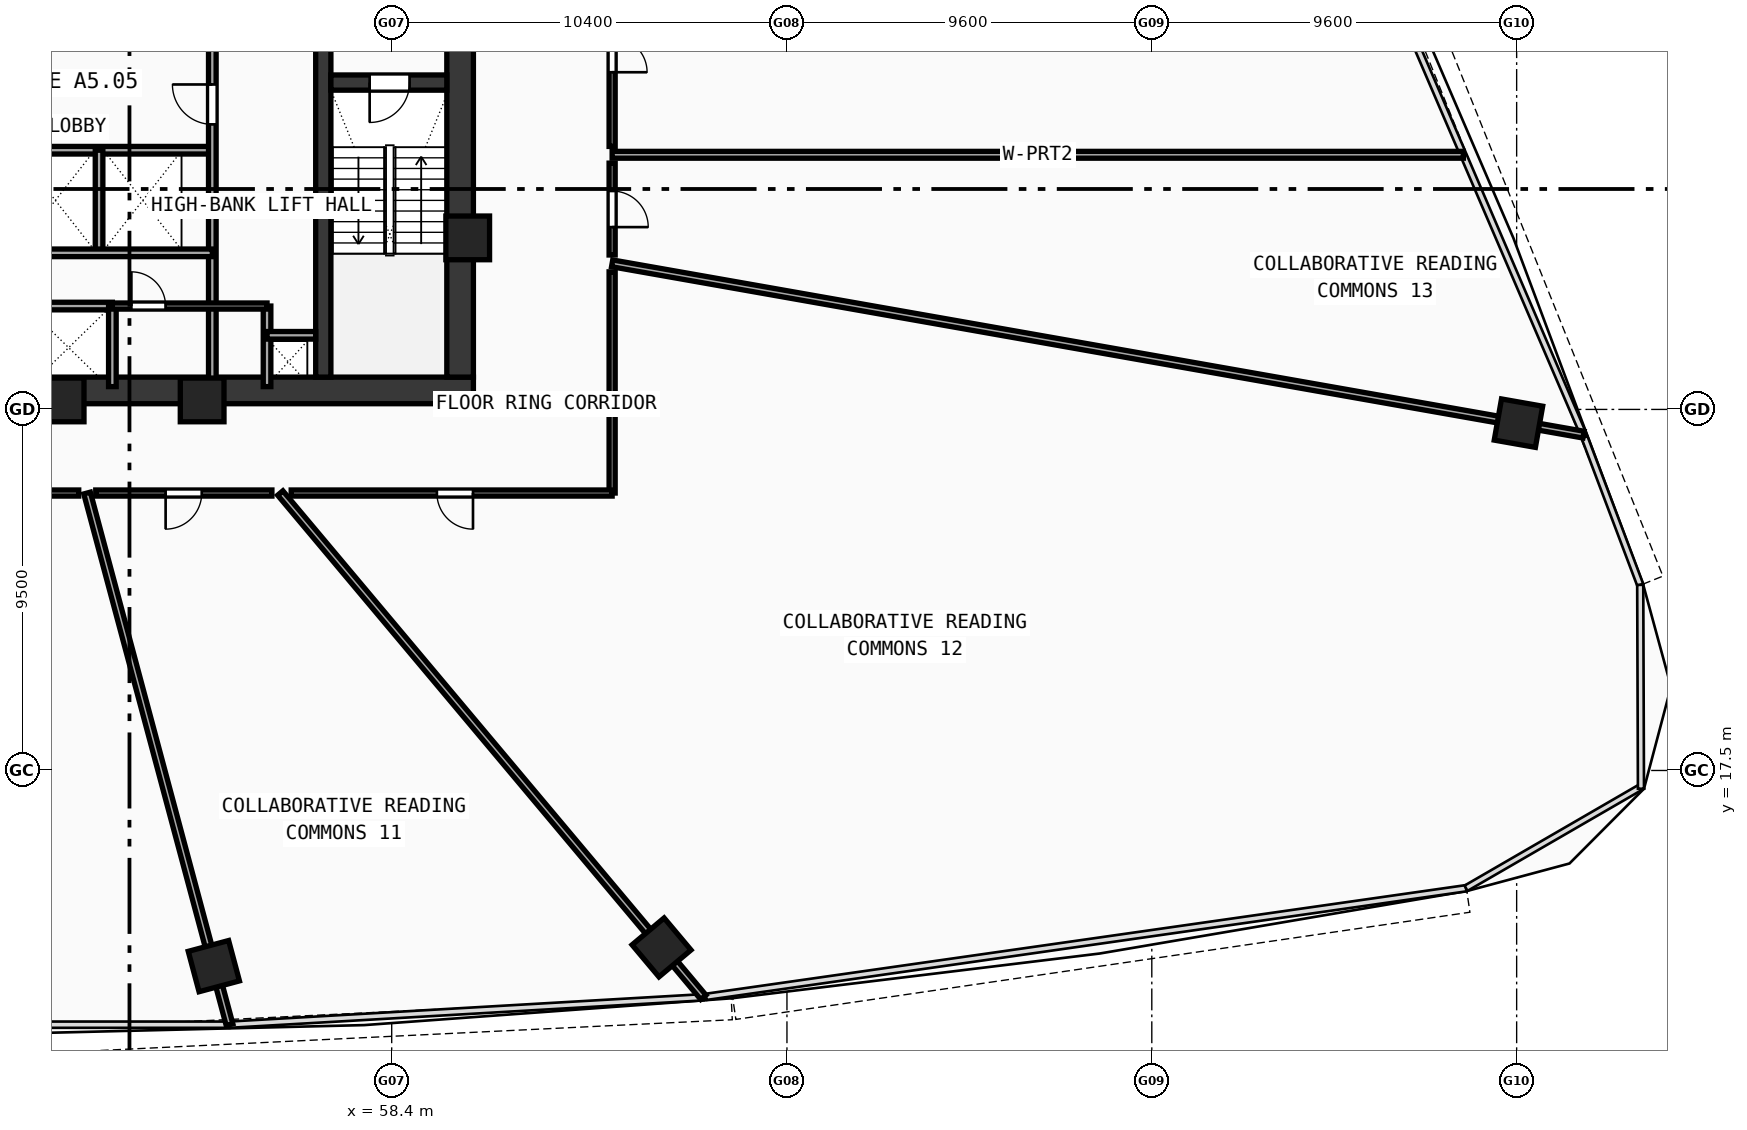
"""IFC4 building model, lengths in metres.
Left out: names, types, materials, properties, quantities, classifications, styles, units other than length and angle.
Written with IfcOpenShell. Run it as: python <this file> out.ifc"""

import sys

from ifc_helpers import new_model, si_unit, direction, frame, frame_2d, origin, origin_with_axes, origin_2d, place, context, subcontext, project, spatial, rectangle, hollow_rectangle, extrude, source, transform, mapped, element, fill, save


model = new_model("IFC4")
c1 = context("Model", 3, precision=1e-05, world=origin(), true_north=direction((0.0, 1.0)))
c2 = subcontext(c1, "Body", "Model", "MODEL_VIEW")
j1 = project(units=[si_unit("LENGTHUNIT", "METRE"), si_unit("PLANEANGLEUNIT", "RADIAN")], contexts=[c1])
p1 = place(None, origin())
s1 = spatial("IfcSite", under=j1, at=p1, CompositionType="ELEMENT")
p2 = place(p1, origin())
s2 = spatial("IfcBuilding", under=s1, at=p2, CompositionType="ELEMENT")
p3 = place(p2, frame((0.0, 0.0, 41.29)))
s3 = spatial("IfcBuildingStorey", under=s2, at=p3, CompositionType="ELEMENT", Elevation=41.29)
p4 = place(p3, frame((35.45, 27.5, 0.0), z_axis=(0.0, 0.0, 1.0), x_axis=(1.0, 0.0, 0.0)))
e1 = element("IfcWall", 1, at=p4, inside=s3, PredefinedType="SHEAR", context=c2, shape_type="SweptSolid", body=[
    extrude(rectangle(XDim=25.1, YDim=0.7, at=frame_2d((12.55, 0.0))), origin(), (0.0, 0.0, 1.0), 3.37),
])
p5 = place(p3, frame((60.2, 27.85, 0.0), z_axis=(0.0, 0.0, 1.0), x_axis=(0.0, 1.0, 0.0)))
e2 = element("IfcWall", 2, at=p5, inside=s3, PredefinedType="SHEAR", context=c2, shape_type="SweptSolid", body=[
    extrude(rectangle(XDim=12.0, YDim=0.7, at=frame_2d((6.0, 0.0))), origin(), (0.0, 0.0, 1.0), 3.37),
])
p6 = place(p3, frame((56.6, 27.85, 0.0), z_axis=(0.0, 0.0, 1.0), x_axis=(0.0, 1.0, 0.0)))
e3 = element("IfcWall", 3, at=p6, inside=s3, PredefinedType="SHEAR", context=c2, shape_type="SweptSolid", body=[
    extrude(rectangle(XDim=12.0, YDim=0.4, at=frame_2d((6.0, 0.0))), origin(), (0.0, 0.0, 1.0), 3.37),
])
p7 = place(p6, frame((9.9, 0.0, 0.0)))
e4 = element("IfcOpeningElement", 4, at=p7, cuts=e3, PredefinedType="OPENING", context=c2, shape_type="SweptSolid", body=[
    extrude(rectangle(XDim=1.1, YDim=2.1, at=frame_2d((0.55, 1.05))), frame((0.0, 0.21, 0.0), z_axis=(0.0, -1.0, 0.0), x_axis=(1.0, 0.0, 0.0)), (0.0, 0.0, 1.0), 0.42),
])
p8 = place(p3, frame((56.8, 35.6, 0.0), z_axis=(0.0, 0.0, 1.0), x_axis=(1.0, 0.0, 0.0)))
e5 = element("IfcWall", 5, at=p8, inside=s3, PredefinedType="SHEAR", context=c2, shape_type="SweptSolid", body=[
    extrude(rectangle(XDim=3.05, YDim=0.4, at=frame_2d((1.525, 0.0))), origin(), (0.0, 0.0, 1.0), 3.37),
])
p9 = place(p8, frame((1.02, 0.0, 0.0)))
e6 = element("IfcOpeningElement", 6, at=p9, cuts=e5, PredefinedType="OPENING", context=c2, shape_type="SweptSolid", body=[
    extrude(rectangle(XDim=1.05, YDim=2.1, at=frame_2d((0.525, 1.05))), frame((0.0, 0.21, 0.0), z_axis=(0.0, -1.0, 0.0), x_axis=(1.0, 0.0, 0.0)), (0.0, 0.0, 1.0), 0.42),
])
m1 = source(origin(), c2, "Body", "SweptSolid", [
    extrude(hollow_rectangle(XDim=1.15, YDim=1.15, WallThickness=0.048, at=origin_2d()), origin(), (0.0, 0.0, 1.0), 3.63),
])
for number, where, z_axis, x_axis in (
    (7, (49.729, 27.25, -0.26), (0.0, 0.0, 1.0), (1.0, 0.0, 0.0)),
    (8, (53.412, 27.25, -0.26), (0.0, 0.0, 1.0), (1.0, 0.0, 0.0)),
    (9, (60.4, 31.513, -0.26), (0.0, 0.0, 1.0), (1.0, 0.0, 0.0)),
):
    element("IfcColumn", number, at=place(p3, frame(where, z_axis=z_axis, x_axis=x_axis)), inside=s3, PredefinedType="COLUMN", context=c2, shape_type="MappedRepresentation", body=[
        mapped(m1, transform((0.0, 0.0, 0.0), scale=1.0)),
    ])
m2 = source(origin(), c2, "Body", "SweptSolid", [
    extrude(hollow_rectangle(XDim=1.1, YDim=1.1, WallThickness=0.045, at=origin_2d()), origin(), (0.0, 0.0, 1.0), 3.63),
])
for number, where, z_axis, x_axis in (
    (10, (53.72, 12.352, -0.26), (0.0, 0.0, 1.0), (0.966, 0.259, 0.0)),
    (11, (65.5, 12.844, -0.26), (0.0, 0.0, 1.0), (0.766, 0.643, 0.0)),
    (12, (88.048, 26.638, -0.26), (0.0, 0.0, 1.0), (0.174, 0.985, 0.0)),
):
    element("IfcColumn", number, at=place(p3, frame(where, z_axis=z_axis, x_axis=x_axis)), inside=s3, PredefinedType="COLUMN", context=c2, shape_type="MappedRepresentation", body=[
        mapped(m2, transform((0.0, 0.0, 0.0), scale=1.0)),
    ])
p10 = place(p3, frame((43.85, 33.82, 0.0), z_axis=(0.0, 0.0, 1.0), x_axis=(1.0, 0.0, 0.0)))
e13 = element("IfcWall", 13, at=p10, inside=s3, PredefinedType="SOLIDWALL", context=c2, shape_type="SweptSolid", body=[
    extrude(rectangle(XDim=9.83, YDim=0.2, at=frame_2d((4.915, 0.0))), origin(), (0.0, 0.0, 1.0), 3.37),
])
p11 = place(p3, frame((53.68, 27.6, 0.0), z_axis=(0.0, 0.0, 1.0), x_axis=(0.0, 1.0, 0.0)))
e14 = element("IfcWall", 14, at=p11, inside=s3, PredefinedType="SOLIDWALL", context=c2, shape_type="SweptSolid", body=[
    extrude(rectangle(XDim=9.05, YDim=0.2, at=frame_2d((4.525, 0.0))), origin(), (0.0, 0.0, 1.0), 3.37),
])
p12 = place(p11, frame((6.9, 0.0, 0.0)))
e15 = element("IfcOpeningElement", 15, at=p12, cuts=e14, PredefinedType="OPENING", context=c2, shape_type="SweptSolid", body=[
    extrude(rectangle(XDim=1.05, YDim=2.1, at=frame_2d((0.525, 1.05))), frame((0.0, 0.11, 0.0), z_axis=(0.0, -1.0, 0.0), x_axis=(1.0, 0.0, 0.0)), (0.0, 0.0, 1.0), 0.22),
])
p13 = place(p3, frame((50.7, 31.12, 0.0), z_axis=(0.0, 0.0, 1.0), x_axis=(0.0, 1.0, 0.0)))
e16 = element("IfcWall", 16, at=p13, inside=s3, PredefinedType="SOLIDWALL", context=c2, shape_type="SweptSolid", body=[
    extrude(rectangle(XDim=2.7, YDim=0.2, at=frame_2d((1.35, 0.0))), origin(), (0.0, 0.0, 1.0), 3.37),
])
p14 = place(p3, frame((43.85, 29.72, 0.0), z_axis=(0.0, 0.0, 1.0), x_axis=(1.0, 0.0, 0.0)))
e17 = element("IfcWall", 17, at=p14, inside=s3, PredefinedType="SOLIDWALL", context=c2, shape_type="SweptSolid", body=[
    extrude(rectangle(XDim=7.2, YDim=0.2, at=frame_2d((3.6, 0.0))), origin(), (0.0, 0.0, 1.0), 3.37),
])
p15 = place(p3, frame((51.05, 27.6, 0.0), z_axis=(0.0, 0.0, 1.0), x_axis=(0.0, 1.0, 0.0)))
e18 = element("IfcWall", 18, at=p15, inside=s3, PredefinedType="SOLIDWALL", context=c2, shape_type="SweptSolid", body=[
    extrude(rectangle(XDim=2.12, YDim=0.2, at=frame_2d((1.06, 0.0))), origin(), (0.0, 0.0, 1.0), 3.37),
])
p16 = place(p3, frame((43.85, 31.12, 0.0), z_axis=(0.0, 0.0, 1.0), x_axis=(1.0, 0.0, 0.0)))
e19 = element("IfcWall", 19, at=p16, inside=s3, PredefinedType="SOLIDWALL", context=c2, shape_type="SweptSolid", body=[
    extrude(rectangle(XDim=9.83, YDim=0.2, at=frame_2d((4.915, 0.0))), origin(), (0.0, 0.0, 1.0), 3.37),
])
p17 = place(p3, frame((55.12, 27.6, 0.0), z_axis=(0.0, 0.0, 1.0), x_axis=(0.0, 1.0, 0.0)))
e20 = element("IfcWall", 20, at=p17, inside=s3, PredefinedType="SOLIDWALL", context=c2, shape_type="SweptSolid", body=[
    extrude(rectangle(XDim=2.12, YDim=0.2, at=frame_2d((1.06, 0.0))), origin(), (0.0, 0.0, 1.0), 3.37),
])
p18 = place(p3, frame((55.12, 28.95, 0.0), z_axis=(0.0, 0.0, 1.0), x_axis=(1.0, 0.0, 0.0)))
e21 = element("IfcWall", 21, at=p18, inside=s3, PredefinedType="SOLIDWALL", context=c2, shape_type="SweptSolid", body=[
    extrude(rectangle(XDim=1.28, YDim=0.2, at=frame_2d((0.64, 0.0))), origin(), (0.0, 0.0, 1.0), 3.37),
])
p19 = place(p3, frame((51.05, 29.72, 0.0), z_axis=(0.0, 0.0, 1.0), x_axis=(1.0, 0.0, 0.0)))
e22 = element("IfcWall", 22, at=p19, inside=s3, PredefinedType="PARTITIONING", context=c2, shape_type="SweptSolid", body=[
    extrude(rectangle(XDim=4.07, YDim=0.16, at=frame_2d((2.035, 0.0))), origin(), (0.0, 0.0, 1.0), 3.37),
])
p20 = place(p19, frame((0.5, 0.0, 0.0)))
e23 = element("IfcOpeningElement", 23, at=p20, cuts=e22, PredefinedType="OPENING", context=c2, shape_type="SweptSolid", body=[
    extrude(rectangle(XDim=0.9, YDim=2.1, at=frame_2d((0.45, 1.05))), frame((0.0, 0.09, 0.0), z_axis=(0.0, -1.0, 0.0), x_axis=(1.0, 0.0, 0.0)), (0.0, 0.0, 1.0), 0.18),
])
p21 = place(p3, frame((64.2, 33.7, 0.0), z_axis=(0.0, 0.0, 1.0), x_axis=(1.0, 0.0, 0.0)))
e24 = element("IfcWall", 24, at=p21, inside=s3, PredefinedType="PARTITIONING", context=c2, shape_type="SweptSolid", body=[
    extrude(rectangle(XDim=22.398, YDim=0.18, at=frame_2d((11.199, 0.0))), origin(), (0.0, 0.0, 1.0), 2.67),
])
p22 = place(p3, frame((50.385, 24.8, 0.0), z_axis=(0.0, 0.0, 1.0), x_axis=(0.258819787056, -0.965925627483, 0.0)))
e25 = element("IfcWall", 25, at=p22, inside=s3, PredefinedType="PARTITIONING", context=c2, shape_type="SweptSolid", body=[
    extrude(rectangle(XDim=14.482, YDim=0.18, at=frame_2d((7.241, 0.0))), origin(), (0.0, 0.0, 1.0), 2.67),
])
p23 = place(p3, frame((55.468, 24.8, 0.0), z_axis=(0.0, 0.0, 1.0), x_axis=(0.642784696521, -0.766046887546, 0.0)))
e26 = element("IfcWall", 26, at=p23, inside=s3, PredefinedType="PARTITIONING", context=c2, shape_type="SweptSolid", body=[
    extrude(rectangle(XDim=17.319, YDim=0.18, at=frame_2d((8.659, 0.0))), origin(), (0.0, 0.0, 1.0), 2.67),
])
p24 = place(p3, frame((64.2, 30.844, 0.0), z_axis=(0.0, 0.0, 1.0), x_axis=(0.984807792045, -0.173647956302, 0.0)))
e27 = element("IfcWall", 27, at=p24, inside=s3, PredefinedType="PARTITIONING", context=c2, shape_type="SweptSolid", body=[
    extrude(rectangle(XDim=25.954, YDim=0.18, at=frame_2d((12.977, 0.0))), origin(), (0.0, 0.0, 1.0), 2.67),
])
p25 = place(p3, frame((64.2, 38.744, 0.0), z_axis=(0.0, 0.0, 1.0), x_axis=(0.0, -1.0, 0.0)))
e28 = element("IfcWall", 28, at=p25, inside=s3, PredefinedType="PARTITIONING", context=c2, shape_type="SweptSolid", body=[
    extrude(rectangle(XDim=4.824, YDim=0.16, at=frame_2d((2.412, 0.0))), origin(), (0.0, 0.0, 1.0), 3.37),
])
p26 = place(p25, frame((1.952, 0.0, 0.0)))
e29 = element("IfcOpeningElement", 29, at=p26, cuts=e28, PredefinedType="OPENING", context=c2, shape_type="SweptSolid", body=[
    extrude(rectangle(XDim=0.92, YDim=2.1, at=frame_2d((0.46, 1.05))), frame((0.0, 0.09, 0.0), z_axis=(0.0, -1.0, 0.0), x_axis=(1.0, 0.0, 0.0)), (0.0, 0.0, 1.0), 0.18),
])
p27 = place(p3, frame((64.2, 33.48, 0.0), z_axis=(0.0, 0.0, 1.0), x_axis=(0.0, -1.0, 0.0)))
e30 = element("IfcWall", 30, at=p27, inside=s3, PredefinedType="PARTITIONING", context=c2, shape_type="SweptSolid", body=[
    extrude(rectangle(XDim=2.417, YDim=0.16, at=frame_2d((1.208, 0.0))), origin(), (0.0, 0.0, 1.0), 3.37),
])
p28 = place(p27, frame((0.733, 0.0, 0.0)))
e31 = element("IfcOpeningElement", 31, at=p28, cuts=e30, PredefinedType="OPENING", context=c2, shape_type="SweptSolid", body=[
    extrude(rectangle(XDim=0.95, YDim=2.1, at=frame_2d((0.475, 1.05))), frame((0.0, 0.09, 0.0), z_axis=(0.0, -1.0, 0.0), x_axis=(1.0, 0.0, 0.0)), (0.0, 0.0, 1.0), 0.18),
])
p29 = place(p3, frame((64.2, 30.62, 0.0), z_axis=(0.0, 0.0, 1.0), x_axis=(0.0, -1.0, 0.0)))
e32 = element("IfcWall", 32, at=p29, inside=s3, PredefinedType="PARTITIONING", context=c2, shape_type="SweptSolid", body=[
    extrude(rectangle(XDim=5.82, YDim=0.16, at=frame_2d((2.91, 0.0))), origin(), (0.0, 0.0, 1.0), 2.97),
])
p30 = place(p3, frame((64.2, 24.8, 0.0), z_axis=(0.0, 0.0, 1.0), x_axis=(-1.0, 0.0, 0.0)))
e33 = element("IfcWall", 33, at=p30, inside=s3, PredefinedType="PARTITIONING", context=c2, shape_type="SweptSolid", body=[
    extrude(rectangle(XDim=8.445, YDim=0.16, at=frame_2d((4.222, 0.0))), origin(), (0.0, 0.0, 1.0), 2.97),
])
p31 = place(p30, frame((3.661, 0.0, 0.0)))
e34 = element("IfcOpeningElement", 34, at=p31, cuts=e33, PredefinedType="OPENING", context=c2, shape_type="SweptSolid", body=[
    extrude(rectangle(XDim=0.95, YDim=2.1, at=frame_2d((0.475, 1.05))), frame((0.0, 0.09, 0.0), z_axis=(0.0, -1.0, 0.0), x_axis=(1.0, 0.0, 0.0)), (0.0, 0.0, 1.0), 0.18),
])
p32 = place(p3, frame((55.248, 24.8, 0.0), z_axis=(0.0, 0.0, 1.0), x_axis=(-1.0, 0.0, 0.0)))
e35 = element("IfcWall", 35, at=p32, inside=s3, PredefinedType="PARTITIONING", context=c2, shape_type="SweptSolid", body=[
    extrude(rectangle(XDim=4.635, YDim=0.16, at=frame_2d((2.318, 0.0))), origin(), (0.0, 0.0, 1.0), 2.67),
])
p33 = place(p32, frame((1.847, 0.0, 0.0)))
e36 = element("IfcOpeningElement", 36, at=p33, cuts=e35, PredefinedType="OPENING", context=c2, shape_type="SweptSolid", body=[
    extrude(rectangle(XDim=0.95, YDim=2.1, at=frame_2d((0.475, 1.05))), frame((0.0, 0.09, 0.0), z_axis=(0.0, -1.0, 0.0), x_axis=(1.0, 0.0, 0.0)), (0.0, 0.0, 1.0), 0.18),
])
p34 = place(p3, frame((50.165, 24.8, 0.0), z_axis=(0.0, 0.0, 1.0), x_axis=(-1.0, 0.0, 0.0)))
e37 = element("IfcWall", 37, at=p34, inside=s3, PredefinedType="PARTITIONING", context=c2, shape_type="SweptSolid", body=[
    extrude(rectangle(XDim=7.948, YDim=0.16, at=frame_2d((3.974, 0.0))), origin(), (0.0, 0.0, 1.0), 2.67),
])
p35 = place(p34, frame((3.499, 0.0, 0.0)))
e38 = element("IfcOpeningElement", 38, at=p35, cuts=e37, PredefinedType="OPENING", context=c2, shape_type="SweptSolid", body=[
    extrude(rectangle(XDim=0.95, YDim=2.1, at=frame_2d((0.475, 1.05))), frame((0.0, 0.09, 0.0), z_axis=(0.0, -1.0, 0.0), x_axis=(1.0, 0.0, 0.0)), (0.0, 0.0, 1.0), 0.18),
])
m3 = source(origin(), c2, "Body", "SweptSolid", [
    extrude(rectangle(XDim=1.05, YDim=2.1, at=frame_2d((0.525, 1.05))), frame((0.0, 0.025, 0.0), z_axis=(0.0, -1.0, 0.0), x_axis=(1.0, 0.0, 0.0)), (0.0, 0.0, 1.0), 0.05),
])
p36 = place(p9, frame((1.05, 0.0, 0.0), z_axis=(0.0, 0.0, 1.0), x_axis=(-1.0, 0.0, 0.0)))
e39 = element("IfcDoor", 39, at=p36, inside=s3, OperationType="SINGLE_SWING_RIGHT", PredefinedType="DOOR", context=c2, shape_type="MappedRepresentation", body=[
    mapped(m3, transform((0.0, 0.0, 0.0), scale=1.0)),
])
fill(e6, e39)
p37 = place(p12, origin_with_axes())
e40 = element("IfcDoor", 40, at=p37, inside=s3, OperationType="SINGLE_SWING_RIGHT", PredefinedType="DOOR", context=c2, shape_type="MappedRepresentation", body=[
    mapped(m3, transform((0.0, 0.0, 0.0), scale=1.0)),
])
fill(e15, e40)
m4 = source(origin(), c2, "Body", "SweptSolid", [
    extrude(rectangle(XDim=0.9, YDim=2.1, at=frame_2d((0.45, 1.05))), frame((0.0, 0.025, 0.0), z_axis=(0.0, -1.0, 0.0), x_axis=(1.0, 0.0, 0.0)), (0.0, 0.0, 1.0), 0.05),
])
p38 = place(p20, origin_with_axes())
e41 = element("IfcDoor", 41, at=p38, inside=s3, OperationType="SINGLE_SWING_LEFT", PredefinedType="DOOR", context=c2, shape_type="MappedRepresentation", body=[
    mapped(m4, transform((0.0, 0.0, 0.0), scale=1.0)),
])
fill(e23, e41)
m5 = source(origin(), c2, "Body", "SweptSolid", [
    extrude(rectangle(XDim=0.92, YDim=2.1, at=frame_2d((0.46, 1.05))), frame((0.0, 0.025, 0.0), z_axis=(0.0, -1.0, 0.0), x_axis=(1.0, 0.0, 0.0)), (0.0, 0.0, 1.0), 0.05),
])
p39 = place(p26, origin_with_axes())
e42 = element("IfcDoor", 42, at=p39, inside=s3, OperationType="SINGLE_SWING_RIGHT", PredefinedType="DOOR", context=c2, shape_type="MappedRepresentation", body=[
    mapped(m5, transform((0.0, 0.0, 0.0), scale=1.0)),
])
fill(e29, e42)
m6 = source(origin(), c2, "Body", "SweptSolid", [
    extrude(rectangle(XDim=0.95, YDim=2.1, at=frame_2d((0.475, 1.05))), frame((0.0, 0.025, 0.0), z_axis=(0.0, -1.0, 0.0), x_axis=(1.0, 0.0, 0.0)), (0.0, 0.0, 1.0), 0.05),
])
p40 = place(p33, origin_with_axes())
e43 = element("IfcDoor", 43, at=p40, inside=s3, OperationType="SINGLE_SWING_RIGHT", PredefinedType="DOOR", context=c2, shape_type="MappedRepresentation", body=[
    mapped(m6, transform((0.0, 0.0, 0.0), scale=1.0)),
])
fill(e36, e43)
p41 = place(p31, origin_with_axes())
e44 = element("IfcDoor", 44, at=p41, inside=s3, OperationType="SINGLE_SWING_LEFT", PredefinedType="DOOR", context=c2, shape_type="MappedRepresentation", body=[
    mapped(m6, transform((0.0, 0.0, 0.0), scale=1.0)),
])
fill(e34, e44)
p42 = place(p28, origin_with_axes())
e45 = element("IfcDoor", 45, at=p42, inside=s3, OperationType="SINGLE_SWING_RIGHT", PredefinedType="DOOR", context=c2, shape_type="MappedRepresentation", body=[
    mapped(m6, transform((0.0, 0.0, 0.0), scale=1.0)),
])
fill(e31, e45)
save(model, sys.argv[1])
